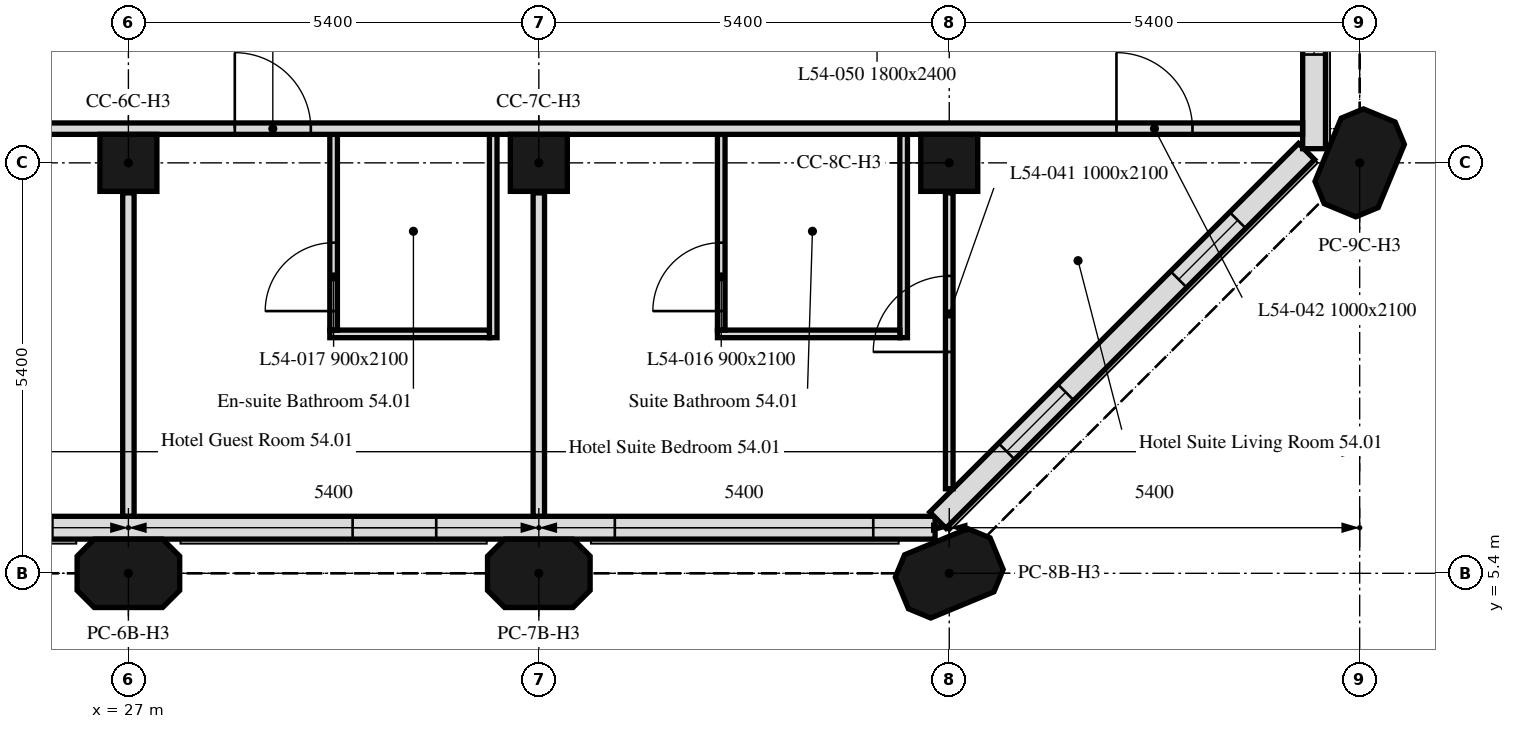
"""IFC4 building model, lengths in metres.
Left out: names, types, materials, properties, quantities, classifications, styles, units other than length and angle.
Written with IfcOpenShell. Run it as: python <this file> out.ifc"""

import sys

from ifc_helpers import new_model, si_unit, direction, frame, frame_2d, origin, origin_2d, place, context, subcontext, project, spatial, polyline, rectangle, outline, extrude, element, fill, save


model = new_model("IFC4")
c1 = context("Model", 3, precision=1e-05, world=origin(), true_north=direction((0.0, 1.0)))
c2 = subcontext(c1, "Body", "Model", "MODEL_VIEW")
j1 = project(units=[si_unit("LENGTHUNIT", "METRE"), si_unit("PLANEANGLEUNIT", "RADIAN")], contexts=[c1])
p1 = place(None, origin())
s1 = spatial("IfcSite", under=j1, at=p1, CompositionType="ELEMENT")
p2 = place(p1, origin())
s2 = spatial("IfcBuilding", under=s1, at=p2, CompositionType="ELEMENT")
p3 = place(p2, frame((0.0, 0.0, 217.0)))
s3 = spatial("IfcBuildingStorey", under=s2, at=p3, CompositionType="ELEMENT", Elevation=217.0)
for number, where, z_axis, x_axis in (
    (1, (27.0, 5.4, 0.0), (0.0, 0.0, 1.0), (1.0, 0.0, 0.0)),
    (2, (32.4, 5.4, 0.0), (0.0, 0.0, 1.0), (1.0, 0.0, 0.0)),
    (3, (37.8, 5.4, 0.0), (0.0, 0.0, 1.0), (0.924, 0.383, 0.0)),
):
    element("IfcColumn", number, at=place(p3, frame(where, z_axis=z_axis, x_axis=x_axis)), inside=s3, PredefinedType="COLUMN", context=c2, shape_type="SweptSolid", body=[
        extrude(outline(polyline([(-0.45, -0.45), (0.45, -0.45), (0.675, -0.225), (0.675, 0.225), (0.45, 0.45), (-0.45, 0.45), (-0.675, 0.225), (-0.675, -0.225), (-0.45, -0.45)])), origin(), (0.0, 0.0, 1.0), 3.0),
    ])
for number, where, z_axis, x_axis in (
    (4, (27.0, 10.8, 0.0), (0.0, 0.0, 1.0), (1.0, 0.0, 0.0)),
    (5, (32.4, 10.8, 0.0), (0.0, 0.0, 1.0), (1.0, 0.0, 0.0)),
    (6, (37.8, 10.8, 0.0), (0.0, 0.0, 1.0), (1.0, 0.0, 0.0)),
):
    element("IfcColumn", number, at=place(p3, frame(where, z_axis=z_axis, x_axis=x_axis)), inside=s3, PredefinedType="COLUMN", context=c2, shape_type="SweptSolid", body=[
        extrude(rectangle(XDim=0.75, YDim=0.75, at=origin_2d()), origin(), (0.0, 0.0, 1.0), 3.0),
    ])
p4 = place(p3, frame((43.2, 10.8, 0.0), z_axis=(0.0, 0.0, 1.0), x_axis=(0.382683432365, 0.923879532511, 0.0)))
e7 = element("IfcColumn", 7, at=p4, inside=s3, PredefinedType="COLUMN", context=c2, shape_type="SweptSolid", body=[
    extrude(outline(polyline([(-0.45, -0.45), (0.45, -0.45), (0.675, -0.225), (0.675, 0.225), (0.45, 0.45), (-0.45, 0.45), (-0.675, 0.225), (-0.675, -0.225), (-0.45, -0.45)])), origin(), (0.0, 0.0, 1.0), 3.0),
])
p5 = place(p3, frame((5.586, 6.0, 0.0), z_axis=(0.0, 0.0, 1.0), x_axis=(1.0, 0.0, 0.0)))
e8 = element("IfcWall", 8, at=p5, inside=s3, PredefinedType="SOLIDWALL", context=c2, shape_type="SweptSolid", body=[
    extrude(rectangle(XDim=32.027, YDim=0.3, at=frame_2d((16.014, 0.0))), origin(), (0.0, 0.0, 1.0), 3.0),
])
p6 = place(p5, frame((2.764, 0.0, 0.9)))
e9 = element("IfcOpeningElement", 9, at=p6, cuts=e8, PredefinedType="OPENING", context=c2, shape_type="SweptSolid", body=[
    extrude(rectangle(XDim=1.1, YDim=1.7, at=frame_2d((0.55, 0.85))), frame((0.0, 0.16, 0.0), z_axis=(0.0, -1.0, 0.0), x_axis=(1.0, 0.0, 0.0)), (0.0, 0.0, 1.0), 0.32),
])
p7 = place(p5, frame((6.214, 0.0, 0.9)))
e10 = element("IfcOpeningElement", 10, at=p7, cuts=e8, PredefinedType="OPENING", context=c2, shape_type="SweptSolid", body=[
    extrude(rectangle(XDim=3.4, YDim=1.7, at=frame_2d((1.7, 0.85))), frame((0.0, 0.16, 0.0), z_axis=(0.0, -1.0, 0.0), x_axis=(1.0, 0.0, 0.0)), (0.0, 0.0, 1.0), 0.32),
])
p8 = place(p5, frame((13.564, 0.0, 0.9)))
e11 = element("IfcOpeningElement", 11, at=p8, cuts=e8, PredefinedType="OPENING", context=c2, shape_type="SweptSolid", body=[
    extrude(rectangle(XDim=1.1, YDim=1.7, at=frame_2d((0.55, 0.85))), frame((0.0, 0.16, 0.0), z_axis=(0.0, -1.0, 0.0), x_axis=(1.0, 0.0, 0.0)), (0.0, 0.0, 1.0), 0.32),
])
p9 = place(p5, frame((17.014, 0.0, 0.9)))
e12 = element("IfcOpeningElement", 12, at=p9, cuts=e8, PredefinedType="OPENING", context=c2, shape_type="SweptSolid", body=[
    extrude(rectangle(XDim=3.4, YDim=1.7, at=frame_2d((1.7, 0.85))), frame((0.0, 0.16, 0.0), z_axis=(0.0, -1.0, 0.0), x_axis=(1.0, 0.0, 0.0)), (0.0, 0.0, 1.0), 0.32),
])
p10 = place(p5, frame((24.364, 0.0, 0.9)))
e13 = element("IfcOpeningElement", 13, at=p10, cuts=e8, PredefinedType="OPENING", context=c2, shape_type="SweptSolid", body=[
    extrude(rectangle(XDim=1.1, YDim=1.7, at=frame_2d((0.55, 0.85))), frame((0.0, 0.16, 0.0), z_axis=(0.0, -1.0, 0.0), x_axis=(1.0, 0.0, 0.0)), (0.0, 0.0, 1.0), 0.32),
])
p11 = place(p5, frame((27.814, 0.0, 0.9)))
e14 = element("IfcOpeningElement", 14, at=p11, cuts=e8, PredefinedType="OPENING", context=c2, shape_type="SweptSolid", body=[
    extrude(rectangle(XDim=3.4, YDim=1.7, at=frame_2d((1.7, 0.85))), frame((0.0, 0.16, 0.0), z_axis=(0.0, -1.0, 0.0), x_axis=(1.0, 0.0, 0.0)), (0.0, 0.0, 1.0), 0.32),
])
p12 = place(p3, frame((37.65, 6.099, 0.0), z_axis=(0.0, 0.0, 1.0), x_axis=(0.707106781187, 0.707106781187, 0.0)))
e15 = element("IfcWall", 15, at=p12, inside=s3, PredefinedType="SOLIDWALL", context=c2, shape_type="SweptSolid", body=[
    extrude(rectangle(XDim=6.86, YDim=0.3, at=frame_2d((3.43, 0.0))), origin(), (0.0, 0.0, 1.0), 3.0),
])
p13 = place(p12, frame((1.28, 0.0, 0.9)))
e16 = element("IfcOpeningElement", 16, at=p13, cuts=e15, PredefinedType="OPENING", context=c2, shape_type="SweptSolid", body=[
    extrude(rectangle(XDim=1.1, YDim=1.7, at=frame_2d((0.55, 0.85))), frame((0.0, 0.16, 0.0), z_axis=(0.0, -1.0, 0.0), x_axis=(1.0, 0.0, 0.0)), (0.0, 0.0, 1.0), 0.32),
])
p14 = place(p12, frame((4.48, 0.0, 0.9)))
e17 = element("IfcOpeningElement", 17, at=p14, cuts=e15, PredefinedType="OPENING", context=c2, shape_type="SweptSolid", body=[
    extrude(rectangle(XDim=1.1, YDim=1.7, at=frame_2d((0.55, 0.85))), frame((0.0, 0.16, 0.0), z_axis=(0.0, -1.0, 0.0), x_axis=(1.0, 0.0, 0.0)), (0.0, 0.0, 1.0), 0.32),
])
p15 = place(p3, frame((42.6, 10.986, 0.0), z_axis=(0.0, 0.0, 1.0), x_axis=(0.0, 1.0, 0.0)))
e18 = element("IfcWall", 18, at=p15, inside=s3, PredefinedType="SOLIDWALL", context=c2, shape_type="SweptSolid", body=[
    extrude(rectangle(XDim=5.214, YDim=0.3, at=frame_2d((2.607, 0.0))), origin(), (0.0, 0.0, 1.0), 3.0),
])
p16 = place(p15, frame((1.239, 0.0, 0.9)))
e19 = element("IfcOpeningElement", 19, at=p16, cuts=e18, PredefinedType="OPENING", context=c2, shape_type="SweptSolid", body=[
    extrude(rectangle(XDim=0.65, YDim=1.7, at=frame_2d((0.325, 0.85))), frame((0.0, 0.16, 0.0), z_axis=(0.0, -1.0, 0.0), x_axis=(1.0, 0.0, 0.0)), (0.0, 0.0, 1.0), 0.32),
])
p17 = place(p15, frame((2.764, 0.0, 0.9)))
e20 = element("IfcOpeningElement", 20, at=p17, cuts=e18, PredefinedType="OPENING", context=c2, shape_type="SweptSolid", body=[
    extrude(rectangle(XDim=1.1, YDim=1.7, at=frame_2d((0.55, 0.85))), frame((0.0, 0.16, 0.0), z_axis=(0.0, -1.0, 0.0), x_axis=(1.0, 0.0, 0.0)), (0.0, 0.0, 1.0), 0.32),
])
p18 = place(p3, frame((37.8, 6.512, 0.0), z_axis=(0.0, 0.0, 1.0), x_axis=(0.0, 1.0, 0.0)))
e21 = element("IfcWall", 21, at=p18, inside=s3, PredefinedType="PARTITIONING", context=c2, shape_type="SweptSolid", body=[
    extrude(rectangle(XDim=3.893, YDim=0.1, at=frame_2d((1.946, 0.0))), origin(), (0.0, 0.0, 1.0), 3.0),
])
p19 = place(p18, frame((1.8, 0.0, 0.0)))
e22 = element("IfcOpeningElement", 22, at=p19, cuts=e21, PredefinedType="OPENING", context=c2, shape_type="SweptSolid", body=[
    extrude(rectangle(XDim=1.0, YDim=2.1, at=frame_2d((0.5, 1.05))), frame((0.0, 0.05, 0.0), z_axis=(0.0, -1.0, 0.0), x_axis=(1.0, 0.0, 0.0)), (0.0, 0.0, 1.0), 0.1),
])
p20 = place(p3, frame((37.2, 11.175, 0.0), z_axis=(0.0, 0.0, 1.0), x_axis=(0.0, -1.0, 0.0)))
e23 = element("IfcWall", 23, at=p20, inside=s3, PredefinedType="PARTITIONING", context=c2, shape_type="SweptSolid", body=[
    extrude(rectangle(XDim=2.675, YDim=0.1, at=frame_2d((1.337, 0.0))), origin(), (0.0, 0.0, 1.0), 3.0),
])
p21 = place(p3, frame((37.15, 8.55, 0.0), z_axis=(0.0, 0.0, 1.0), x_axis=(-1.0, 0.0, 0.0)))
e24 = element("IfcWall", 24, at=p21, inside=s3, PredefinedType="PARTITIONING", context=c2, shape_type="SweptSolid", body=[
    extrude(rectangle(XDim=2.4, YDim=0.1, at=frame_2d((1.2, 0.0))), origin(), (0.0, 0.0, 1.0), 3.0),
])
p22 = place(p3, frame((34.8, 8.6, 0.0), z_axis=(0.0, 0.0, 1.0), x_axis=(0.0, 1.0, 0.0)))
e25 = element("IfcWall", 25, at=p22, inside=s3, PredefinedType="PARTITIONING", context=c2, shape_type="SweptSolid", body=[
    extrude(rectangle(XDim=2.575, YDim=0.1, at=frame_2d((1.288, 0.0))), origin(), (0.0, 0.0, 1.0), 3.0),
])
p23 = place(p22, frame((0.25, 0.0, 0.0)))
e26 = element("IfcOpeningElement", 26, at=p23, cuts=e25, PredefinedType="OPENING", context=c2, shape_type="SweptSolid", body=[
    extrude(rectangle(XDim=0.9, YDim=2.1, at=frame_2d((0.45, 1.05))), frame((0.0, 0.05, 0.0), z_axis=(0.0, -1.0, 0.0), x_axis=(1.0, 0.0, 0.0)), (0.0, 0.0, 1.0), 0.1),
])
p24 = place(p3, frame((32.4, 10.405, 0.0), z_axis=(0.0, 0.0, 1.0), x_axis=(0.0, -1.0, 0.0)))
e27 = element("IfcWall", 27, at=p24, inside=s3, PredefinedType="PARTITIONING", context=c2, shape_type="SweptSolid", body=[
    extrude(rectangle(XDim=4.254, YDim=0.15, at=frame_2d((2.127, 0.0))), origin(), (0.0, 0.0, 1.0), 3.0),
])
p25 = place(p3, frame((31.8, 11.175, 0.0), z_axis=(0.0, 0.0, 1.0), x_axis=(0.0, -1.0, 0.0)))
e28 = element("IfcWall", 28, at=p25, inside=s3, PredefinedType="PARTITIONING", context=c2, shape_type="SweptSolid", body=[
    extrude(rectangle(XDim=2.675, YDim=0.1, at=frame_2d((1.337, 0.0))), origin(), (0.0, 0.0, 1.0), 3.0),
])
p26 = place(p3, frame((31.75, 8.55, 0.0), z_axis=(0.0, 0.0, 1.0), x_axis=(-1.0, 0.0, 0.0)))
e29 = element("IfcWall", 29, at=p26, inside=s3, PredefinedType="PARTITIONING", context=c2, shape_type="SweptSolid", body=[
    extrude(rectangle(XDim=2.1, YDim=0.1, at=frame_2d((1.05, 0.0))), origin(), (0.0, 0.0, 1.0), 3.0),
])
p27 = place(p3, frame((29.7, 8.6, 0.0), z_axis=(0.0, 0.0, 1.0), x_axis=(0.0, 1.0, 0.0)))
e30 = element("IfcWall", 30, at=p27, inside=s3, PredefinedType="PARTITIONING", context=c2, shape_type="SweptSolid", body=[
    extrude(rectangle(XDim=2.575, YDim=0.1, at=frame_2d((1.288, 0.0))), origin(), (0.0, 0.0, 1.0), 3.0),
])
p28 = place(p27, frame((0.25, 0.0, 0.0)))
e31 = element("IfcOpeningElement", 31, at=p28, cuts=e30, PredefinedType="OPENING", context=c2, shape_type="SweptSolid", body=[
    extrude(rectangle(XDim=0.9, YDim=2.1, at=frame_2d((0.45, 1.05))), frame((0.0, 0.05, 0.0), z_axis=(0.0, -1.0, 0.0), x_axis=(1.0, 0.0, 0.0)), (0.0, 0.0, 1.0), 0.1),
])
p29 = place(p3, frame((27.0, 10.405, 0.0), z_axis=(0.0, 0.0, 1.0), x_axis=(0.0, -1.0, 0.0)))
e32 = element("IfcWall", 32, at=p29, inside=s3, PredefinedType="PARTITIONING", context=c2, shape_type="SweptSolid", body=[
    extrude(rectangle(XDim=4.254, YDim=0.15, at=frame_2d((2.127, 0.0))), origin(), (0.0, 0.0, 1.0), 3.0),
])
p30 = place(p3, frame((0.751, 11.25, 0.0), z_axis=(0.0, 0.0, 1.0), x_axis=(1.0, 0.0, 0.0)))
e33 = element("IfcWall", 33, at=p30, inside=s3, PredefinedType="PARTITIONING", context=c2, shape_type="SweptSolid", body=[
    extrude(rectangle(XDim=41.698, YDim=0.15, at=frame_2d((20.849, 0.0))), origin(), (0.0, 0.0, 1.0), 3.0),
])
p31 = place(p30, frame((39.249, 0.0, 0.0)))
e34 = element("IfcOpeningElement", 34, at=p31, cuts=e33, PredefinedType="OPENING", context=c2, shape_type="SweptSolid", body=[
    extrude(rectangle(XDim=1.0, YDim=2.1, at=frame_2d((0.5, 1.05))), frame((0.0, 0.075, 0.0), z_axis=(0.0, -1.0, 0.0), x_axis=(1.0, 0.0, 0.0)), (0.0, 0.0, 1.0), 0.15),
])
p32 = place(p30, frame((27.649, 0.0, 0.0)))
e35 = element("IfcOpeningElement", 35, at=p32, cuts=e33, PredefinedType="OPENING", context=c2, shape_type="SweptSolid", body=[
    extrude(rectangle(XDim=1.0, YDim=2.1, at=frame_2d((0.5, 1.05))), frame((0.0, 0.075, 0.0), z_axis=(0.0, -1.0, 0.0), x_axis=(1.0, 0.0, 0.0)), (0.0, 0.0, 1.0), 0.15),
])
p33 = place(p30, frame((23.049, 0.0, 0.0)))
e36 = element("IfcOpeningElement", 36, at=p33, cuts=e33, PredefinedType="OPENING", context=c2, shape_type="SweptSolid", body=[
    extrude(rectangle(XDim=1.0, YDim=2.1, at=frame_2d((0.5, 1.05))), frame((0.0, 0.075, 0.0), z_axis=(0.0, -1.0, 0.0), x_axis=(1.0, 0.0, 0.0)), (0.0, 0.0, 1.0), 0.15),
])
p34 = place(p30, frame((11.449, 0.0, 0.0)))
e37 = element("IfcOpeningElement", 37, at=p34, cuts=e33, PredefinedType="OPENING", context=c2, shape_type="SweptSolid", body=[
    extrude(rectangle(XDim=1.0, YDim=2.1, at=frame_2d((0.5, 1.05))), frame((0.0, 0.075, 0.0), z_axis=(0.0, -1.0, 0.0), x_axis=(1.0, 0.0, 0.0)), (0.0, 0.0, 1.0), 0.15),
])
p35 = place(p30, frame((2.744, 0.0, 0.0)))
e38 = element("IfcOpeningElement", 38, at=p35, cuts=e33, PredefinedType="OPENING", context=c2, shape_type="SweptSolid", body=[
    extrude(rectangle(XDim=1.0, YDim=2.1, at=frame_2d((0.5, 1.05))), frame((0.0, 0.075, 0.0), z_axis=(0.0, -1.0, 0.0), x_axis=(1.0, 0.0, 0.0)), (0.0, 0.0, 1.0), 0.15),
])
p36 = place(p10, origin())
e39 = element("IfcWindow", 39, at=p36, inside=s3, PartitioningType="SINGLE_PANEL", PredefinedType="WINDOW", context=c2, shape_type="SweptSolid", body=[
    extrude(rectangle(XDim=1.1, YDim=1.7, at=frame_2d((0.55, 0.85))), frame((0.0, 0.03, 0.0), z_axis=(0.0, -1.0, 0.0), x_axis=(1.0, 0.0, 0.0)), (0.0, 0.0, 1.0), 0.06),
])
fill(e13, e39)
p37 = place(p11, origin())
e40 = element("IfcWindow", 40, at=p37, inside=s3, PartitioningType="SINGLE_PANEL", PredefinedType="WINDOW", context=c2, shape_type="SweptSolid", body=[
    extrude(rectangle(XDim=3.4, YDim=1.7, at=frame_2d((1.7, 0.85))), frame((0.0, 0.03, 0.0), z_axis=(0.0, -1.0, 0.0), x_axis=(1.0, 0.0, 0.0)), (0.0, 0.0, 1.0), 0.06),
])
fill(e14, e40)
p38 = place(p13, origin())
e41 = element("IfcWindow", 41, at=p38, inside=s3, PartitioningType="SINGLE_PANEL", PredefinedType="WINDOW", context=c2, shape_type="SweptSolid", body=[
    extrude(rectangle(XDim=1.1, YDim=1.7, at=frame_2d((0.55, 0.85))), frame((0.0, 0.03, 0.0), z_axis=(0.0, -1.0, 0.0), x_axis=(1.0, 0.0, 0.0)), (0.0, 0.0, 1.0), 0.06),
])
fill(e16, e41)
p39 = place(p14, origin())
e42 = element("IfcWindow", 42, at=p39, inside=s3, PartitioningType="SINGLE_PANEL", PredefinedType="WINDOW", context=c2, shape_type="SweptSolid", body=[
    extrude(rectangle(XDim=1.1, YDim=1.7, at=frame_2d((0.55, 0.85))), frame((0.0, 0.03, 0.0), z_axis=(0.0, -1.0, 0.0), x_axis=(1.0, 0.0, 0.0)), (0.0, 0.0, 1.0), 0.06),
])
fill(e17, e42)
p40 = place(p16, origin())
e43 = element("IfcWindow", 43, at=p40, inside=s3, PartitioningType="SINGLE_PANEL", PredefinedType="WINDOW", context=c2, shape_type="SweptSolid", body=[
    extrude(rectangle(XDim=0.65, YDim=1.7, at=frame_2d((0.325, 0.85))), frame((0.0, 0.03, 0.0), z_axis=(0.0, -1.0, 0.0), x_axis=(1.0, 0.0, 0.0)), (0.0, 0.0, 1.0), 0.06),
])
fill(e19, e43)
p41 = place(p23, origin())
e44 = element("IfcDoor", 44, at=p41, inside=s3, OperationType="SINGLE_SWING_RIGHT", PredefinedType="DOOR", context=c2, shape_type="SweptSolid", body=[
    extrude(rectangle(XDim=0.9, YDim=2.1, at=frame_2d((0.45, 1.05))), frame((0.0, 0.025, 0.0), z_axis=(0.0, -1.0, 0.0), x_axis=(1.0, 0.0, 0.0)), (0.0, 0.0, 1.0), 0.05),
])
fill(e26, e44)
p42 = place(p28, origin())
e45 = element("IfcDoor", 45, at=p42, inside=s3, OperationType="SINGLE_SWING_RIGHT", PredefinedType="DOOR", context=c2, shape_type="SweptSolid", body=[
    extrude(rectangle(XDim=0.9, YDim=2.1, at=frame_2d((0.45, 1.05))), frame((0.0, 0.025, 0.0), z_axis=(0.0, -1.0, 0.0), x_axis=(1.0, 0.0, 0.0)), (0.0, 0.0, 1.0), 0.05),
])
fill(e31, e45)
p43 = place(p19, origin())
e46 = element("IfcDoor", 46, at=p43, inside=s3, OperationType="SINGLE_SWING_RIGHT", PredefinedType="DOOR", context=c2, shape_type="SweptSolid", body=[
    extrude(rectangle(XDim=1.0, YDim=2.1, at=frame_2d((0.5, 1.05))), frame((0.0, 0.025, 0.0), z_axis=(0.0, -1.0, 0.0), x_axis=(1.0, 0.0, 0.0)), (0.0, 0.0, 1.0), 0.05),
])
fill(e22, e46)
p44 = place(p31, origin())
e47 = element("IfcDoor", 47, at=p44, inside=s3, OperationType="SINGLE_SWING_LEFT", PredefinedType="DOOR", context=c2, shape_type="SweptSolid", body=[
    extrude(rectangle(XDim=1.0, YDim=2.1, at=frame_2d((0.5, 1.05))), frame((0.0, 0.025, 0.0), z_axis=(0.0, -1.0, 0.0), x_axis=(1.0, 0.0, 0.0)), (0.0, 0.0, 1.0), 0.05),
])
fill(e34, e47)
p45 = place(p32, origin())
e48 = element("IfcDoor", 48, at=p45, inside=s3, OperationType="SINGLE_SWING_LEFT", PredefinedType="DOOR", context=c2, shape_type="SweptSolid", body=[
    extrude(rectangle(XDim=1.0, YDim=2.1, at=frame_2d((0.5, 1.05))), frame((0.0, 0.025, 0.0), z_axis=(0.0, -1.0, 0.0), x_axis=(1.0, 0.0, 0.0)), (0.0, 0.0, 1.0), 0.05),
])
fill(e35, e48)
save(model, sys.argv[1])
